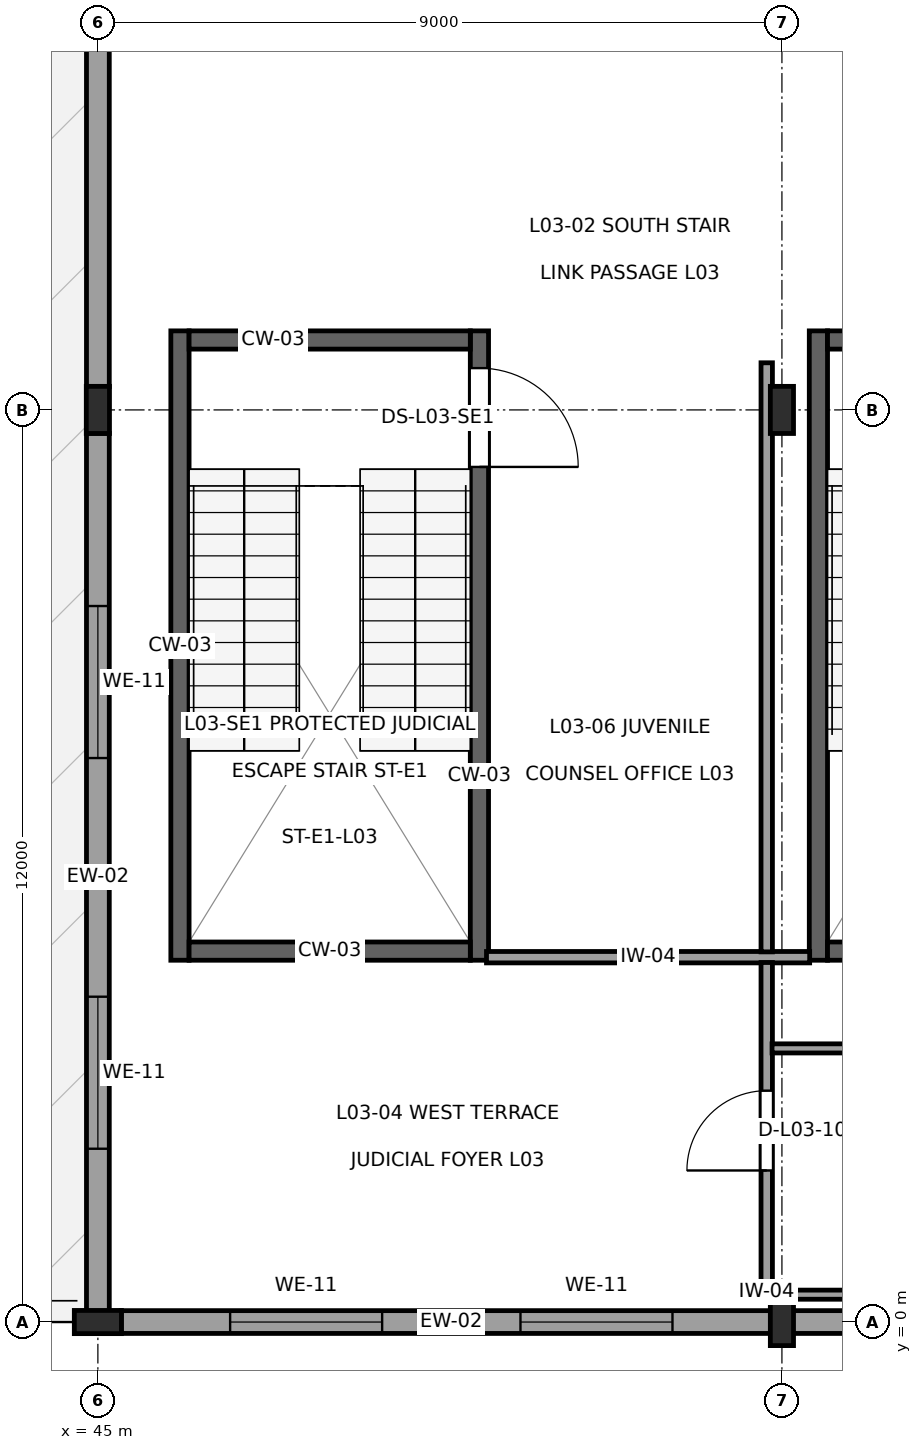
"""IFC4 building model, lengths in metres.
Left out: names, types, materials, properties, quantities, classifications, styles, units other than length and angle.
Written with IfcOpenShell. Run it as: python <this file> out.ifc"""

import sys

from ifc_helpers import new_model, si_unit, direction, frame, frame_2d, origin, origin_2d, place, context, subcontext, project, spatial, rectangle, i_section, extrude, element, fill, save


model = new_model("IFC4")
c1 = context("Model", 3, precision=1e-05, world=origin(), true_north=direction((0.0, 1.0)))
c2 = subcontext(c1, "Body", "Model", "MODEL_VIEW")
j1 = project(units=[si_unit("LENGTHUNIT", "METRE"), si_unit("PLANEANGLEUNIT", "RADIAN")], contexts=[c1])
p1 = place(None, origin())
s1 = spatial("IfcSite", under=j1, at=p1, CompositionType="ELEMENT")
p2 = place(p1, origin())
s2 = spatial("IfcBuilding", under=s1, at=p2, CompositionType="ELEMENT")
p3 = place(p2, frame((0.0, 0.0, 14.4)))
s3 = spatial("IfcBuildingStorey", under=s2, at=p3, CompositionType="ELEMENT", Elevation=14.4)
for number, where, z_axis, x_axis in (
    (1, (45.0, 0.0, 0.0), (0.0, 0.0, 1.0), (0.0, 1.0, 0.0)),
    (2, (45.0, 12.0, 0.0), (0.0, 0.0, 1.0), (1.0, 0.0, 0.0)),
    (3, (54.0, 0.0, 0.0), (0.0, 0.0, 1.0), (1.0, 0.0, 0.0)),
    (4, (54.0, 12.0, 0.0), (0.0, 0.0, 1.0), (1.0, 0.0, 0.0)),
):
    element("IfcColumn", number, at=place(p3, frame(where, z_axis=z_axis, x_axis=x_axis)), inside=s3, PredefinedType="COLUMN", context=c2, shape_type="SweptSolid", body=[
        extrude(i_section(OverallWidth=0.305, OverallDepth=0.62, WebThickness=0.021, FlangeThickness=0.04, at=origin_2d()), origin(), (0.0, 0.0, 1.0), 4.5),
    ])
p4 = place(p3, frame((45.308, 0.0, 0.0), z_axis=(0.0, 0.0, 1.0), x_axis=(1.0, 0.0, 0.0)))
e5 = element("IfcWall", 5, at=p4, inside=s3, PredefinedType="SOLIDWALL", context=c2, shape_type="SweptSolid", body=[
    extrude(rectangle(XDim=8.684, YDim=0.3, at=frame_2d((4.342, 0.0))), origin(), (0.0, 0.0, 1.0), 3.675),
])
p5 = place(p4, frame((1.432, 0.0, 0.85)))
e6 = element("IfcOpeningElement", 6, at=p5, cuts=e5, PredefinedType="OPENING", context=c2, shape_type="SweptSolid", body=[
    extrude(rectangle(XDim=2.0, YDim=2.0, at=frame_2d((1.0, 1.0))), frame((0.0, 0.165, 0.0), z_axis=(0.0, -1.0, 0.0), x_axis=(1.0, 0.0, 0.0)), (0.0, 0.0, 1.0), 0.33),
])
p6 = place(p4, frame((5.252, 0.0, 0.85)))
e7 = element("IfcOpeningElement", 7, at=p6, cuts=e5, PredefinedType="OPENING", context=c2, shape_type="SweptSolid", body=[
    extrude(rectangle(XDim=2.0, YDim=2.0, at=frame_2d((1.0, 1.0))), frame((0.0, 0.165, 0.0), z_axis=(0.0, -1.0, 0.0), x_axis=(1.0, 0.0, 0.0)), (0.0, 0.0, 1.0), 0.33),
])
p7 = place(p3, frame((54.008, 0.0, 0.0), z_axis=(0.0, 0.0, 1.0), x_axis=(1.0, 0.0, 0.0)))
e8 = element("IfcWall", 8, at=p7, inside=s3, PredefinedType="SOLIDWALL", context=c2, shape_type="SweptSolid", body=[
    extrude(rectangle(XDim=8.984, YDim=0.3, at=frame_2d((4.492, 0.0))), origin(), (0.0, 0.0, 1.0), 3.675),
])
p8 = place(p7, frame((1.516, 0.0, 0.85)))
e9 = element("IfcOpeningElement", 9, at=p8, cuts=e8, PredefinedType="OPENING", context=c2, shape_type="SweptSolid", body=[
    extrude(rectangle(XDim=2.0, YDim=2.0, at=frame_2d((1.0, 1.0))), frame((0.0, 0.165, 0.0), z_axis=(0.0, -1.0, 0.0), x_axis=(1.0, 0.0, 0.0)), (0.0, 0.0, 1.0), 0.33),
])
p9 = place(p7, frame((5.468, 0.0, 0.85)))
e10 = element("IfcOpeningElement", 10, at=p9, cuts=e8, PredefinedType="OPENING", context=c2, shape_type="SweptSolid", body=[
    extrude(rectangle(XDim=2.0, YDim=2.0, at=frame_2d((1.0, 1.0))), frame((0.0, 0.165, 0.0), z_axis=(0.0, -1.0, 0.0), x_axis=(1.0, 0.0, 0.0)), (0.0, 0.0, 1.0), 0.33),
])
p10 = place(p3, frame((45.0, 23.644, 0.0), z_axis=(0.0, 0.0, 1.0), x_axis=(0.0, -1.0, 0.0)))
e11 = element("IfcWall", 11, at=p10, inside=s3, PredefinedType="SOLIDWALL", context=c2, shape_type="SweptSolid", body=[
    extrude(rectangle(XDim=11.336, YDim=0.3, at=frame_2d((5.668, 0.0))), origin(), (0.0, 0.0, 1.0), 3.685),
])
p11 = place(p10, frame((5.444, 0.0, 0.0)))
e12 = element("IfcOpeningElement", 12, at=p11, cuts=e11, PredefinedType="OPENING", context=c2, shape_type="SweptSolid", body=[
    extrude(rectangle(XDim=1.4, YDim=2.3, at=frame_2d((0.7, 1.15))), frame((0.0, 0.165, 0.0), z_axis=(0.0, -1.0, 0.0), x_axis=(1.0, 0.0, 0.0)), (0.0, 0.0, 1.0), 0.33),
])
p12 = place(p3, frame((45.0, 11.692, 0.0), z_axis=(0.0, 0.0, 1.0), x_axis=(0.0, -1.0, 0.0)))
e13 = element("IfcWall", 13, at=p12, inside=s3, PredefinedType="SOLIDWALL", context=c2, shape_type="SweptSolid", body=[
    extrude(rectangle(XDim=11.684, YDim=0.3, at=frame_2d((5.842, 0.0))), origin(), (0.0, 0.0, 1.0), 3.685),
])
p13 = place(p12, frame((2.272, 0.0, 0.85)))
e14 = element("IfcOpeningElement", 14, at=p13, cuts=e13, PredefinedType="OPENING", context=c2, shape_type="SweptSolid", body=[
    extrude(rectangle(XDim=2.0, YDim=2.0, at=frame_2d((1.0, 1.0))), frame((0.0, 0.165, 0.0), z_axis=(0.0, -1.0, 0.0), x_axis=(1.0, 0.0, 0.0)), (0.0, 0.0, 1.0), 0.33),
])
p14 = place(p12, frame((7.412, 0.0, 0.85)))
e15 = element("IfcOpeningElement", 15, at=p14, cuts=e13, PredefinedType="OPENING", context=c2, shape_type="SweptSolid", body=[
    extrude(rectangle(XDim=2.0, YDim=2.0, at=frame_2d((1.0, 1.0))), frame((0.0, 0.165, 0.0), z_axis=(0.0, -1.0, 0.0), x_axis=(1.0, 0.0, 0.0)), (0.0, 0.0, 1.0), 0.33),
])
p15 = place(p3, frame((54.48, 4.76, 0.0), z_axis=(0.0, 0.0, 1.0), x_axis=(0.0, 1.0, 0.0)))
e16 = element("IfcWall", 16, at=p15, inside=s3, PredefinedType="SHEAR", context=c2, shape_type="SweptSolid", body=[
    extrude(rectangle(XDim=8.28, YDim=0.24, at=frame_2d((4.14, 0.0))), origin(), (0.0, 0.0, 1.0), 4.31),
])
for number, where, z_axis, x_axis in (
    (17, (54.6, 4.88, 0.0), (0.0, 0.0, 1.0), (1.0, 0.0, 0.0)),
    (18, (54.6, 12.92, 0.0), (0.0, 0.0, 1.0), (1.0, 0.0, 0.0)),
):
    element("IfcWall", number, at=place(p3, frame(where, z_axis=z_axis, x_axis=x_axis)), inside=s3, PredefinedType="SHEAR", context=c2, shape_type="SweptSolid", body=[
        extrude(rectangle(XDim=3.7, YDim=0.24, at=frame_2d((1.85, 0.0))), origin(), (0.0, 0.0, 1.0), 4.31),
    ])
p16 = place(p3, frame((46.08, 4.76, 0.0), z_axis=(0.0, 0.0, 1.0), x_axis=(0.0, 1.0, 0.0)))
e19 = element("IfcWall", 19, at=p16, inside=s3, PredefinedType="SHEAR", context=c2, shape_type="SweptSolid", body=[
    extrude(rectangle(XDim=8.28, YDim=0.24, at=frame_2d((4.14, 0.0))), origin(), (0.0, 0.0, 1.0), 4.31),
])
p17 = place(p3, frame((50.02, 4.76, 0.0), z_axis=(0.0, 0.0, 1.0), x_axis=(0.0, 1.0, 0.0)))
e20 = element("IfcWall", 20, at=p17, inside=s3, PredefinedType="SHEAR", context=c2, shape_type="SweptSolid", body=[
    extrude(rectangle(XDim=8.28, YDim=0.24, at=frame_2d((4.14, 0.0))), origin(), (0.0, 0.0, 1.0), 4.31),
])
p18 = place(p17, frame((6.49, 0.0, 0.0)))
e21 = element("IfcOpeningElement", 21, at=p18, cuts=e20, PredefinedType="OPENING", context=c2, shape_type="SweptSolid", body=[
    extrude(rectangle(XDim=1.3, YDim=2.2, at=frame_2d((0.65, 1.1))), frame((0.0, 0.135, 0.0), z_axis=(0.0, -1.0, 0.0), x_axis=(1.0, 0.0, 0.0)), (0.0, 0.0, 1.0), 0.27),
])
for number, where, z_axis, x_axis in (
    (22, (46.2, 4.88, 0.0), (0.0, 0.0, 1.0), (1.0, 0.0, 0.0)),
    (23, (46.2, 12.92, 0.0), (0.0, 0.0, 1.0), (1.0, 0.0, 0.0)),
):
    element("IfcWall", number, at=place(p3, frame(where, z_axis=z_axis, x_axis=x_axis)), inside=s3, PredefinedType="SHEAR", context=c2, shape_type="SweptSolid", body=[
        extrude(rectangle(XDim=3.7, YDim=0.24, at=frame_2d((1.85, 0.0))), origin(), (0.0, 0.0, 1.0), 4.31),
    ])
p19 = place(p3, frame((50.113, 4.8, 0.0), z_axis=(0.0, 0.0, 1.0), x_axis=(1.0, 0.0, 0.0)))
e24 = element("IfcWall", 24, at=p19, inside=s3, PredefinedType="PARTITIONING", context=c2, shape_type="SweptSolid", body=[
    extrude(rectangle(XDim=4.252, YDim=0.15, at=frame_2d((2.126, 0.0))), origin(), (0.0, 0.0, 1.0), 4.14),
])
p20 = place(p3, frame((53.8, 4.73, 0.0), z_axis=(0.0, 0.0, 1.0), x_axis=(0.0, -1.0, 0.0)))
e25 = element("IfcWall", 25, at=p20, inside=s3, PredefinedType="PARTITIONING", context=c2, shape_type="SweptSolid", body=[
    extrude(rectangle(XDim=4.422, YDim=0.15, at=frame_2d((2.211, 0.0))), origin(), (0.0, 0.0, 1.0), 3.625),
])
p21 = place(p20, frame((1.686, 0.0, 0.0)))
e26 = element("IfcOpeningElement", 26, at=p21, cuts=e25, PredefinedType="OPENING", context=c2, shape_type="SweptSolid", body=[
    extrude(rectangle(XDim=1.05, YDim=2.25, at=frame_2d((0.525, 1.125))), frame((0.0, 0.09, 0.0), z_axis=(0.0, -1.0, 0.0), x_axis=(1.0, 0.0, 0.0)), (0.0, 0.0, 1.0), 0.18),
])
p22 = place(p3, frame((71.92, 0.36, 0.0), z_axis=(0.0, 0.0, 1.0), x_axis=(-1.0, 0.0, 0.0)))
e27 = element("IfcWall", 27, at=p22, inside=s3, PredefinedType="PARTITIONING", context=c2, shape_type="SweptSolid", body=[
    extrude(rectangle(XDim=18.112, YDim=0.12, at=frame_2d((9.056, 0.0))), origin(), (0.0, 0.0, 1.0), 4.14),
])
p23 = place(p3, frame((53.87, 3.6, 0.0), z_axis=(0.0, 0.0, 1.0), x_axis=(1.0, 0.0, 0.0)))
e28 = element("IfcWall", 28, at=p23, inside=s3, PredefinedType="PARTITIONING", context=c2, shape_type="SweptSolid", body=[
    extrude(rectangle(XDim=63.25, YDim=0.12, at=frame_2d((31.625, 0.0))), origin(), (0.0, 0.0, 1.0), 4.14),
])
p24 = place(p23, frame((19.855, 0.0, 0.0)))
e29 = element("IfcOpeningElement", 29, at=p24, cuts=e28, PredefinedType="OPENING", context=c2, shape_type="SweptSolid", body=[
    extrude(rectangle(XDim=0.95, YDim=2.15, at=frame_2d((0.475, 1.075))), frame((0.0, 0.075, 0.0), z_axis=(0.0, -1.0, 0.0), x_axis=(1.0, 0.0, 0.0)), (0.0, 0.0, 1.0), 0.15),
])
p25 = place(p3, frame((53.8, 12.62, 0.0), z_axis=(0.0, 0.0, 1.0), x_axis=(0.0, -1.0, 0.0)))
e30 = element("IfcWall", 30, at=p25, inside=s3, PredefinedType="PARTITIONING", context=c2, shape_type="SweptSolid", body=[
    extrude(rectangle(XDim=7.75, YDim=0.15, at=frame_2d((3.875, 0.0))), origin(), (0.0, 0.0, 1.0), 3.625),
])
p26 = place(p5, origin())
e31 = element("IfcWindow", 31, at=p26, inside=s3, PartitioningType="SINGLE_PANEL", PredefinedType="WINDOW", context=c2, shape_type="SweptSolid", body=[
    extrude(rectangle(XDim=2.0, YDim=2.0, at=frame_2d((1.0, 1.0))), frame((0.0, 0.03, 0.0), z_axis=(0.0, -1.0, 0.0), x_axis=(1.0, 0.0, 0.0)), (0.0, 0.0, 1.0), 0.06),
])
fill(e6, e31)
p27 = place(p6, origin())
e32 = element("IfcWindow", 32, at=p27, inside=s3, PartitioningType="SINGLE_PANEL", PredefinedType="WINDOW", context=c2, shape_type="SweptSolid", body=[
    extrude(rectangle(XDim=2.0, YDim=2.0, at=frame_2d((1.0, 1.0))), frame((0.0, 0.03, 0.0), z_axis=(0.0, -1.0, 0.0), x_axis=(1.0, 0.0, 0.0)), (0.0, 0.0, 1.0), 0.06),
])
fill(e7, e32)
p28 = place(p13, origin())
e33 = element("IfcWindow", 33, at=p28, inside=s3, PartitioningType="SINGLE_PANEL", PredefinedType="WINDOW", context=c2, shape_type="SweptSolid", body=[
    extrude(rectangle(XDim=2.0, YDim=2.0, at=frame_2d((1.0, 1.0))), frame((0.0, 0.03, 0.0), z_axis=(0.0, -1.0, 0.0), x_axis=(1.0, 0.0, 0.0)), (0.0, 0.0, 1.0), 0.06),
])
fill(e14, e33)
p29 = place(p14, origin())
e34 = element("IfcWindow", 34, at=p29, inside=s3, PartitioningType="SINGLE_PANEL", PredefinedType="WINDOW", context=c2, shape_type="SweptSolid", body=[
    extrude(rectangle(XDim=2.0, YDim=2.0, at=frame_2d((1.0, 1.0))), frame((0.0, 0.03, 0.0), z_axis=(0.0, -1.0, 0.0), x_axis=(1.0, 0.0, 0.0)), (0.0, 0.0, 1.0), 0.06),
])
fill(e15, e34)
p30 = place(p18, frame((1.3, 0.0, 0.0), z_axis=(0.0, 0.0, 1.0), x_axis=(-1.0, 0.0, 0.0)))
e35 = element("IfcDoor", 35, at=p30, inside=s3, OperationType="SINGLE_SWING_LEFT", PredefinedType="DOOR", context=c2, shape_type="SweptSolid", body=[
    extrude(rectangle(XDim=1.3, YDim=2.2, at=frame_2d((0.65, 1.1))), frame((0.0, 0.025, 0.0), z_axis=(0.0, -1.0, 0.0), x_axis=(1.0, 0.0, 0.0)), (0.0, 0.0, 1.0), 0.05),
])
fill(e21, e35)
p31 = place(p21, frame((1.05, 0.0, 0.0), z_axis=(0.0, 0.0, 1.0), x_axis=(-1.0, 0.0, 0.0)))
e36 = element("IfcDoor", 36, at=p31, inside=s3, OperationType="SINGLE_SWING_RIGHT", PredefinedType="DOOR", context=c2, shape_type="SweptSolid", body=[
    extrude(rectangle(XDim=1.05, YDim=2.25, at=frame_2d((0.525, 1.125))), frame((0.0, 0.025, 0.0), z_axis=(0.0, -1.0, 0.0), x_axis=(1.0, 0.0, 0.0)), (0.0, 0.0, 1.0), 0.05),
])
fill(e26, e36)
save(model, sys.argv[1])
